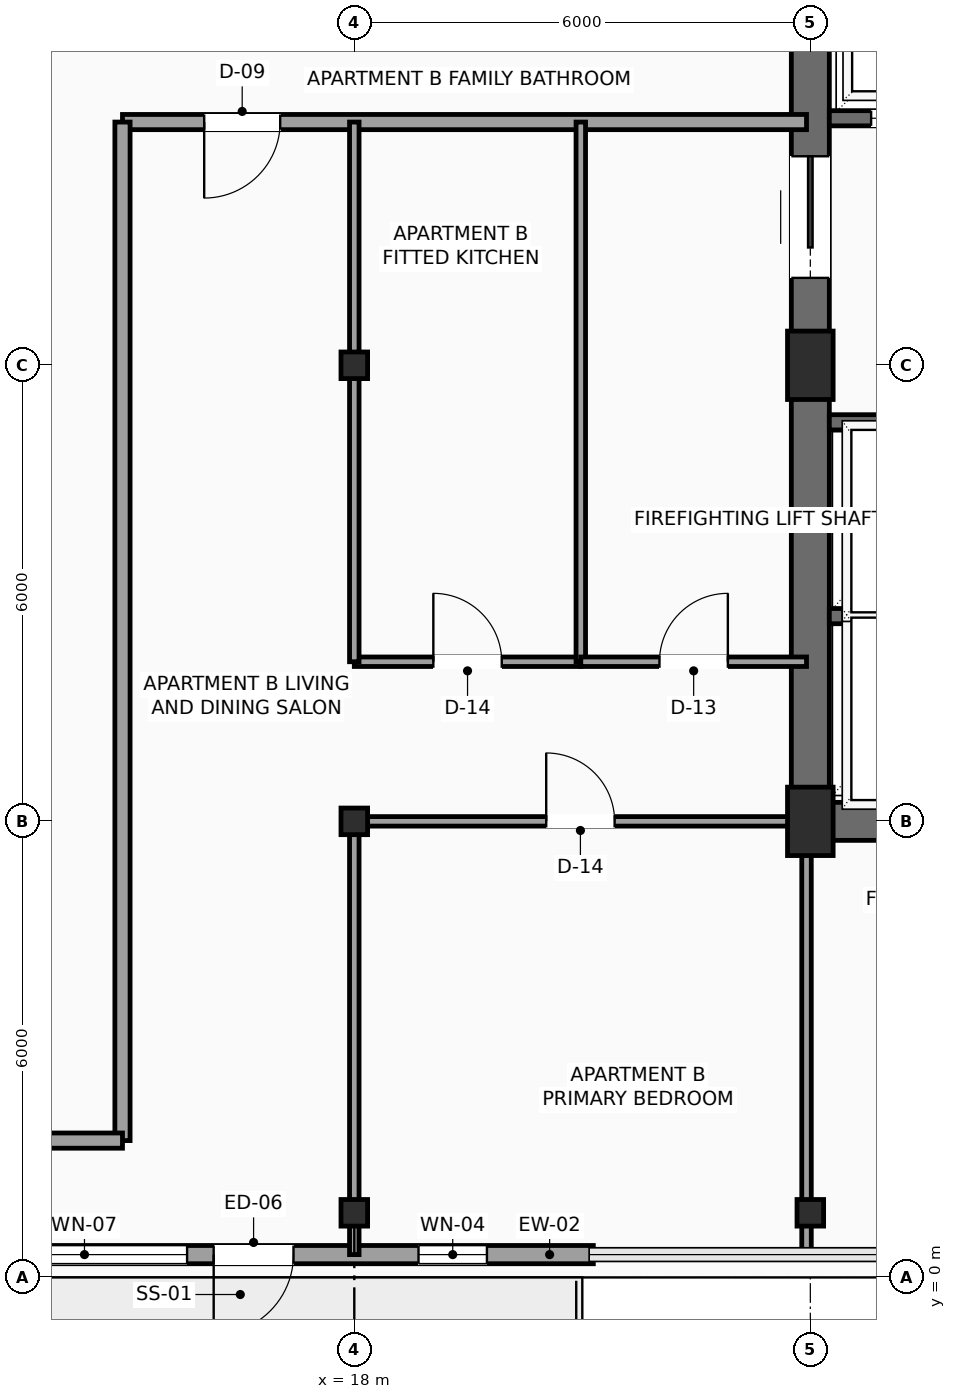
"""IFC4 building model, lengths in metres.
Left out: names, types, materials, properties, quantities, classifications, styles, units other than length and angle.
Written with IfcOpenShell. Run it as: python <this file> out.ifc"""

import sys

from ifc_helpers import new_model, si_unit, direction, frame, frame_2d, origin, origin_2d, place, context, subcontext, project, spatial, rectangle, hollow_rectangle, extrude, element, fill, save


model = new_model("IFC4")
c1 = context("Model", 3, precision=1e-05, world=origin(), true_north=direction((0.0, 1.0)))
c2 = subcontext(c1, "Body", "Model", "MODEL_VIEW")
j1 = project(units=[si_unit("LENGTHUNIT", "METRE"), si_unit("PLANEANGLEUNIT", "RADIAN")], contexts=[c1])
p1 = place(None, origin())
s1 = spatial("IfcSite", under=j1, at=p1, CompositionType="ELEMENT")
p2 = place(p1, origin())
s2 = spatial("IfcBuilding", under=s1, at=p2, CompositionType="ELEMENT")
p3 = place(p2, frame((0.0, 0.0, 250.2)))
s3 = spatial("IfcBuildingStorey", under=s2, at=p3, CompositionType="ELEMENT", Elevation=250.2)
for number, where, z_axis, x_axis in (
    (1, (24.0, 6.0, 0.0), (0.0, 0.0, 1.0), (1.0, 0.0, 0.0)),
    (2, (24.0, 12.0, 0.0), (0.0, 0.0, 1.0), (1.0, 0.0, 0.0)),
):
    element("IfcColumn", number, at=place(p3, frame(where, z_axis=z_axis, x_axis=x_axis)), inside=s3, PredefinedType="COLUMN", context=c2, shape_type="SweptSolid", body=[
        extrude(rectangle(XDim=0.6, YDim=0.9, at=origin_2d()), origin(), (0.0, 0.0, 1.0), 3.5),
    ])
for number, where, z_axis, x_axis in (
    (3, (18.0, 0.85, 0.0), (0.0, 0.0, 1.0), (1.0, 0.0, 0.0)),
    (4, (18.0, 6.0, 0.0), (0.0, 0.0, 1.0), (1.0, 0.0, 0.0)),
    (5, (18.0, 12.0, 0.0), (0.0, 0.0, 1.0), (1.0, 0.0, 0.0)),
    (6, (24.0, 0.85, 0.0), (0.0, 0.0, 1.0), (1.0, 0.0, 0.0)),
):
    element("IfcColumn", number, at=place(p3, frame(where, z_axis=z_axis, x_axis=x_axis)), inside=s3, PredefinedType="COLUMN", context=c2, shape_type="SweptSolid", body=[
        extrude(hollow_rectangle(XDim=0.35, YDim=0.35, WallThickness=0.016, InnerFilletRadius=0.016, OuterFilletRadius=0.032, at=origin_2d()), origin(), (0.0, 0.0, 1.0), 3.5),
    ])
p4 = place(p3, frame((21.145, 0.3, 0.0), z_axis=(0.0, 0.0, 1.0), x_axis=(-1.0, 0.0, 0.0)))
e7 = element("IfcWall", 7, at=p4, inside=s3, PredefinedType="SOLIDWALL", context=c2, shape_type="SweptSolid", body=[
    extrude(rectangle(XDim=9.29, YDim=0.24, at=frame_2d((4.645, 0.0))), origin(), (0.0, 0.0, 1.0), 3.3),
])
p5 = place(p4, frame((3.945, 0.0, 0.0)))
e8 = element("IfcOpeningElement", 8, at=p5, cuts=e7, PredefinedType="OPENING", context=c2, shape_type="SweptSolid", body=[
    extrude(rectangle(XDim=1.05, YDim=2.2, at=frame_2d((0.525, 1.1))), frame((0.0, 0.13, 0.0), z_axis=(0.0, -1.0, 0.0), x_axis=(1.0, 0.0, 0.0)), (0.0, 0.0, 1.0), 0.26),
])
p6 = place(p4, frame((5.345, 0.0, 0.6)))
e9 = element("IfcOpeningElement", 9, at=p6, cuts=e7, PredefinedType="OPENING", context=c2, shape_type="SweptSolid", body=[
    extrude(rectangle(XDim=2.7, YDim=2.3, at=frame_2d((1.35, 1.15))), frame((0.0, 0.13, 0.0), z_axis=(0.0, -1.0, 0.0), x_axis=(1.0, 0.0, 0.0)), (0.0, 0.0, 1.0), 0.26),
])
p7 = place(p4, frame((1.4, 0.0, 0.6)))
e10 = element("IfcOpeningElement", 10, at=p7, cuts=e7, PredefinedType="OPENING", context=c2, shape_type="SweptSolid", body=[
    extrude(rectangle(XDim=0.9, YDim=2.2, at=frame_2d((0.45, 1.1))), frame((0.0, 0.13, 0.0), z_axis=(0.0, -1.0, 0.0), x_axis=(1.0, 0.0, 0.0)), (0.0, 0.0, 1.0), 0.26),
])
p8 = place(p3, frame((24.0, 6.0, 0.0), z_axis=(0.0, 0.0, 1.0), x_axis=(1.0, 0.0, 0.0)))
e11 = element("IfcWall", 11, at=p8, inside=s3, PredefinedType="SHEAR", context=c2, shape_type="SweptSolid", body=[
    extrude(rectangle(XDim=9.6, YDim=0.5, at=frame_2d((4.8, 0.0))), origin(), (0.0, 0.0, 1.0), 3.3),
])
p9 = place(p3, frame((24.0, 6.0, 0.0), z_axis=(0.0, 0.0, 1.0), x_axis=(0.0, 1.0, 0.0)))
e12 = element("IfcWall", 12, at=p9, inside=s3, PredefinedType="SHEAR", context=c2, shape_type="SweptSolid", body=[
    extrude(rectangle(XDim=12.0, YDim=0.5, at=frame_2d((6.0, 0.0))), origin(), (0.0, 0.0, 1.0), 3.3),
])
p10 = place(p9, frame((7.15, 0.0, 0.0)))
e13 = element("IfcOpeningElement", 13, at=p10, cuts=e12, PredefinedType="OPENING", context=c2, shape_type="SweptSolid", body=[
    extrude(rectangle(XDim=1.6, YDim=2.3, at=frame_2d((0.8, 1.15))), frame((0.0, 0.26, 0.0), z_axis=(0.0, -1.0, 0.0), x_axis=(1.0, 0.0, 0.0)), (0.0, 0.0, 1.0), 0.52),
])
for number, where, z_axis, x_axis in (
    (14, (24.25, 8.7, 0.0), (0.0, 0.0, 1.0), (1.0, 0.0, 0.0)),
    (15, (24.25, 11.25, 0.0), (0.0, 0.0, 1.0), (1.0, 0.0, 0.0)),
):
    element("IfcWall", number, at=place(p3, frame(where, z_axis=z_axis, x_axis=x_axis)), inside=s3, PredefinedType="SHEAR", context=c2, shape_type="SweptSolid", body=[
        extrude(rectangle(XDim=2.17, YDim=0.2, at=frame_2d((1.085, 0.0))), origin(), (0.0, 0.0, 1.0), 3.3),
    ])
p11 = place(p3, frame((24.25, 15.25, 0.0), z_axis=(0.0, 0.0, 1.0), x_axis=(1.0, 0.0, 0.0)))
e16 = element("IfcWall", 16, at=p11, inside=s3, PredefinedType="SHEAR", context=c2, shape_type="SweptSolid", body=[
    extrude(rectangle(XDim=5.2, YDim=0.2, at=frame_2d((2.6, 0.0))), origin(), (0.0, 0.0, 1.0), 3.3),
])
p12 = place(p11, frame((0.55, 0.0, 0.0)))
e17 = element("IfcOpeningElement", 17, at=p12, cuts=e16, PredefinedType="OPENING", context=c2, shape_type="SweptSolid", body=[
    extrude(rectangle(XDim=1.2, YDim=2.2, at=frame_2d((0.6, 1.1))), frame((0.0, 0.11, 0.0), z_axis=(0.0, -1.0, 0.0), x_axis=(1.0, 0.0, 0.0)), (0.0, 0.0, 1.0), 0.22),
])
p13 = place(p11, frame((3.15, 0.0, 0.0)))
e18 = element("IfcOpeningElement", 18, at=p13, cuts=e16, PredefinedType="OPENING", context=c2, shape_type="SweptSolid", body=[
    extrude(rectangle(XDim=1.2, YDim=2.2, at=frame_2d((0.6, 1.1))), frame((0.0, 0.11, 0.0), z_axis=(0.0, -1.0, 0.0), x_axis=(1.0, 0.0, 0.0)), (0.0, 0.0, 1.0), 0.22),
])
p14 = place(p3, frame((23.95, 15.2, 0.0), z_axis=(0.0, 0.0, 1.0), x_axis=(-1.0, 0.0, 0.0)))
e19 = element("IfcWall", 19, at=p14, inside=s3, PredefinedType="SOLIDWALL", context=c2, shape_type="SweptSolid", body=[
    extrude(rectangle(XDim=9.0, YDim=0.2, at=frame_2d((4.5, 0.0))), origin(), (0.0, 0.0, 1.0), 2.932),
])
p15 = place(p14, frame((6.925, 0.0, 0.0)))
e20 = element("IfcOpeningElement", 20, at=p15, cuts=e19, PredefinedType="OPENING", context=c2, shape_type="SweptSolid", body=[
    extrude(rectangle(XDim=1.0, YDim=2.2, at=frame_2d((0.5, 1.1))), frame((0.0, 0.11, 0.0), z_axis=(0.0, -1.0, 0.0), x_axis=(1.0, 0.0, 0.0)), (0.0, 0.0, 1.0), 0.22),
])
p16 = place(p3, frame((14.95, 15.2, 0.0), z_axis=(0.0, 0.0, 1.0), x_axis=(0.0, -1.0, 0.0)))
e21 = element("IfcWall", 21, at=p16, inside=s3, PredefinedType="SOLIDWALL", context=c2, shape_type="SweptSolid", body=[
    extrude(rectangle(XDim=13.4, YDim=0.2, at=frame_2d((6.7, 0.0))), origin(), (0.0, 0.0, 1.0), 3.3),
])
p17 = place(p3, frame((14.95, 1.8, 0.0), z_axis=(0.0, 0.0, 1.0), x_axis=(-1.0, 0.0, 0.0)))
e22 = element("IfcWall", 22, at=p17, inside=s3, PredefinedType="SOLIDWALL", context=c2, shape_type="SweptSolid", body=[
    extrude(rectangle(XDim=2.35, YDim=0.2, at=frame_2d((1.175, 0.0))), origin(), (0.0, 0.0, 1.0), 3.3),
])
p18 = place(p3, frame((18.0, 8.1, 0.0), z_axis=(0.0, 0.0, 1.0), x_axis=(1.0, 0.0, 0.0)))
e23 = element("IfcWall", 23, at=p18, inside=s3, PredefinedType="PARTITIONING", context=c2, shape_type="SweptSolid", body=[
    extrude(rectangle(XDim=2.98, YDim=0.125, at=frame_2d((1.49, 0.0))), origin(), (0.0, 0.0, 1.0), 3.3),
])
p19 = place(p18, frame((1.04, 0.0, 0.0)))
e24 = element("IfcOpeningElement", 24, at=p19, cuts=e23, PredefinedType="OPENING", context=c2, shape_type="SweptSolid", body=[
    extrude(rectangle(XDim=0.9, YDim=2.1, at=frame_2d((0.45, 1.05))), frame((0.0, 0.073, 0.0), z_axis=(0.0, -1.0, 0.0), x_axis=(1.0, 0.0, 0.0)), (0.0, 0.0, 1.0), 0.145),
])
p20 = place(p3, frame((18.0, 8.1, 0.0), z_axis=(0.0, 0.0, 1.0), x_axis=(0.0, 1.0, 0.0)))
e25 = element("IfcWall", 25, at=p20, inside=s3, PredefinedType="PARTITIONING", context=c2, shape_type="SweptSolid", body=[
    extrude(rectangle(XDim=7.1, YDim=0.125, at=frame_2d((3.55, 0.0))), origin(), (0.0, 0.0, 1.0), 2.992),
])
p21 = place(p3, frame((20.98, 8.1, 0.0), z_axis=(0.0, 0.0, 1.0), x_axis=(0.0, 1.0, 0.0)))
e26 = element("IfcWall", 26, at=p21, inside=s3, PredefinedType="PARTITIONING", context=c2, shape_type="SweptSolid", body=[
    extrude(rectangle(XDim=7.1, YDim=0.125, at=frame_2d((3.55, 0.0))), origin(), (0.0, 0.0, 1.0), 3.3),
])
p22 = place(p3, frame((20.98, 8.1, 0.0), z_axis=(0.0, 0.0, 1.0), x_axis=(1.0, 0.0, 0.0)))
e27 = element("IfcWall", 27, at=p22, inside=s3, PredefinedType="PARTITIONING", context=c2, shape_type="SweptSolid", body=[
    extrude(rectangle(XDim=2.97, YDim=0.125, at=frame_2d((1.485, 0.0))), origin(), (0.0, 0.0, 1.0), 3.3),
])
p23 = place(p22, frame((1.035, 0.0, 0.0)))
e28 = element("IfcOpeningElement", 28, at=p23, cuts=e27, PredefinedType="OPENING", context=c2, shape_type="SweptSolid", body=[
    extrude(rectangle(XDim=0.9, YDim=2.1, at=frame_2d((0.45, 1.05))), frame((0.0, 0.073, 0.0), z_axis=(0.0, -1.0, 0.0), x_axis=(1.0, 0.0, 0.0)), (0.0, 0.0, 1.0), 0.145),
])
p24 = place(p3, frame((18.0, 6.0, 0.0), z_axis=(0.0, 0.0, 1.0), x_axis=(1.0, 0.0, 0.0)))
e29 = element("IfcWall", 29, at=p24, inside=s3, PredefinedType="PARTITIONING", context=c2, shape_type="SweptSolid", body=[
    extrude(rectangle(XDim=5.95, YDim=0.125, at=frame_2d((2.975, 0.0))), origin(), (0.0, 0.0, 1.0), 2.992),
])
p25 = place(p24, frame((2.525, 0.0, 0.0)))
e30 = element("IfcOpeningElement", 30, at=p25, cuts=e29, PredefinedType="OPENING", context=c2, shape_type="SweptSolid", body=[
    extrude(rectangle(XDim=0.9, YDim=2.1, at=frame_2d((0.45, 1.05))), frame((0.0, 0.073, 0.0), z_axis=(0.0, -1.0, 0.0), x_axis=(1.0, 0.0, 0.0)), (0.0, 0.0, 1.0), 0.145),
])
p26 = place(p3, frame((18.0, 0.3, 0.0), z_axis=(0.0, 0.0, 1.0), x_axis=(0.0, 1.0, 0.0)))
e31 = element("IfcWall", 31, at=p26, inside=s3, PredefinedType="PARTITIONING", context=c2, shape_type="SweptSolid", body=[
    extrude(rectangle(XDim=5.7, YDim=0.125, at=frame_2d((2.85, 0.0))), origin(), (0.0, 0.0, 1.0), 2.967),
])
p27 = place(p3, frame((23.95, 0.3, 0.0), z_axis=(0.0, 0.0, 1.0), x_axis=(0.0, 1.0, 0.0)))
e32 = element("IfcWall", 32, at=p27, inside=s3, PredefinedType="PARTITIONING", context=c2, shape_type="SweptSolid", body=[
    extrude(rectangle(XDim=5.7, YDim=0.125, at=frame_2d((2.85, 0.0))), origin(), (0.0, 0.0, 1.0), 2.992),
])
p28 = place(p5, origin())
e33 = element("IfcDoor", 33, at=p28, inside=s3, OperationType="SINGLE_SWING_RIGHT", PredefinedType="DOOR", context=c2, shape_type="SweptSolid", body=[
    extrude(rectangle(XDim=1.05, YDim=2.2, at=frame_2d((0.525, 1.1))), frame((0.0, 0.025, 0.0), z_axis=(0.0, -1.0, 0.0), x_axis=(1.0, 0.0, 0.0)), (0.0, 0.0, 1.0), 0.05),
])
fill(e8, e33)
p29 = place(p6, origin())
e34 = element("IfcWindow", 34, at=p29, inside=s3, PartitioningType="SINGLE_PANEL", PredefinedType="WINDOW", context=c2, shape_type="SweptSolid", body=[
    extrude(rectangle(XDim=2.7, YDim=2.3, at=frame_2d((1.35, 1.15))), frame((0.0, 0.03, 0.0), z_axis=(0.0, -1.0, 0.0), x_axis=(1.0, 0.0, 0.0)), (0.0, 0.0, 1.0), 0.06),
])
fill(e9, e34)
p30 = place(p7, origin())
e35 = element("IfcWindow", 35, at=p30, inside=s3, PartitioningType="SINGLE_PANEL", PredefinedType="WINDOW", context=c2, shape_type="SweptSolid", body=[
    extrude(rectangle(XDim=0.9, YDim=2.2, at=frame_2d((0.45, 1.1))), frame((0.0, 0.03, 0.0), z_axis=(0.0, -1.0, 0.0), x_axis=(1.0, 0.0, 0.0)), (0.0, 0.0, 1.0), 0.06),
])
fill(e10, e35)
p31 = place(p10, origin())
e36 = element("IfcDoor", 36, at=p31, inside=s3, OperationType="DOUBLE_DOOR_SLIDING", PredefinedType="DOOR", context=c2, shape_type="SweptSolid", body=[
    extrude(rectangle(XDim=1.6, YDim=2.3, at=frame_2d((0.8, 1.15))), frame((0.0, 0.025, 0.0), z_axis=(0.0, -1.0, 0.0), x_axis=(1.0, 0.0, 0.0)), (0.0, 0.0, 1.0), 0.05),
])
fill(e13, e36)
p32 = place(p12, origin())
e37 = element("IfcDoor", 37, at=p32, inside=s3, OperationType="SLIDING_TO_RIGHT", PredefinedType="DOOR", context=c2, shape_type="SweptSolid", body=[
    extrude(rectangle(XDim=1.2, YDim=2.2, at=frame_2d((0.6, 1.1))), frame((0.0, 0.025, 0.0), z_axis=(0.0, -1.0, 0.0), x_axis=(1.0, 0.0, 0.0)), (0.0, 0.0, 1.0), 0.05),
])
fill(e17, e37)
p33 = place(p15, origin())
e38 = element("IfcDoor", 38, at=p33, inside=s3, OperationType="SINGLE_SWING_RIGHT", PredefinedType="DOOR", context=c2, shape_type="SweptSolid", body=[
    extrude(rectangle(XDim=1.0, YDim=2.2, at=frame_2d((0.5, 1.1))), frame((0.0, 0.025, 0.0), z_axis=(0.0, -1.0, 0.0), x_axis=(1.0, 0.0, 0.0)), (0.0, 0.0, 1.0), 0.05),
])
fill(e20, e38)
p34 = place(p19, origin())
e39 = element("IfcDoor", 39, at=p34, inside=s3, OperationType="SINGLE_SWING_LEFT", PredefinedType="DOOR", context=c2, shape_type="SweptSolid", body=[
    extrude(rectangle(XDim=0.9, YDim=2.1, at=frame_2d((0.45, 1.05))), frame((0.0, 0.025, 0.0), z_axis=(0.0, -1.0, 0.0), x_axis=(1.0, 0.0, 0.0)), (0.0, 0.0, 1.0), 0.05),
])
fill(e24, e39)
p35 = place(p23, origin())
e40 = element("IfcDoor", 40, at=p35, inside=s3, OperationType="SINGLE_SWING_RIGHT", PredefinedType="DOOR", context=c2, shape_type="SweptSolid", body=[
    extrude(rectangle(XDim=0.9, YDim=2.1, at=frame_2d((0.45, 1.05))), frame((0.0, 0.025, 0.0), z_axis=(0.0, -1.0, 0.0), x_axis=(1.0, 0.0, 0.0)), (0.0, 0.0, 1.0), 0.05),
])
fill(e28, e40)
p36 = place(p25, origin())
e41 = element("IfcDoor", 41, at=p36, inside=s3, OperationType="SINGLE_SWING_LEFT", PredefinedType="DOOR", context=c2, shape_type="SweptSolid", body=[
    extrude(rectangle(XDim=0.9, YDim=2.1, at=frame_2d((0.45, 1.05))), frame((0.0, 0.025, 0.0), z_axis=(0.0, -1.0, 0.0), x_axis=(1.0, 0.0, 0.0)), (0.0, 0.0, 1.0), 0.05),
])
fill(e30, e41)
save(model, sys.argv[1])
